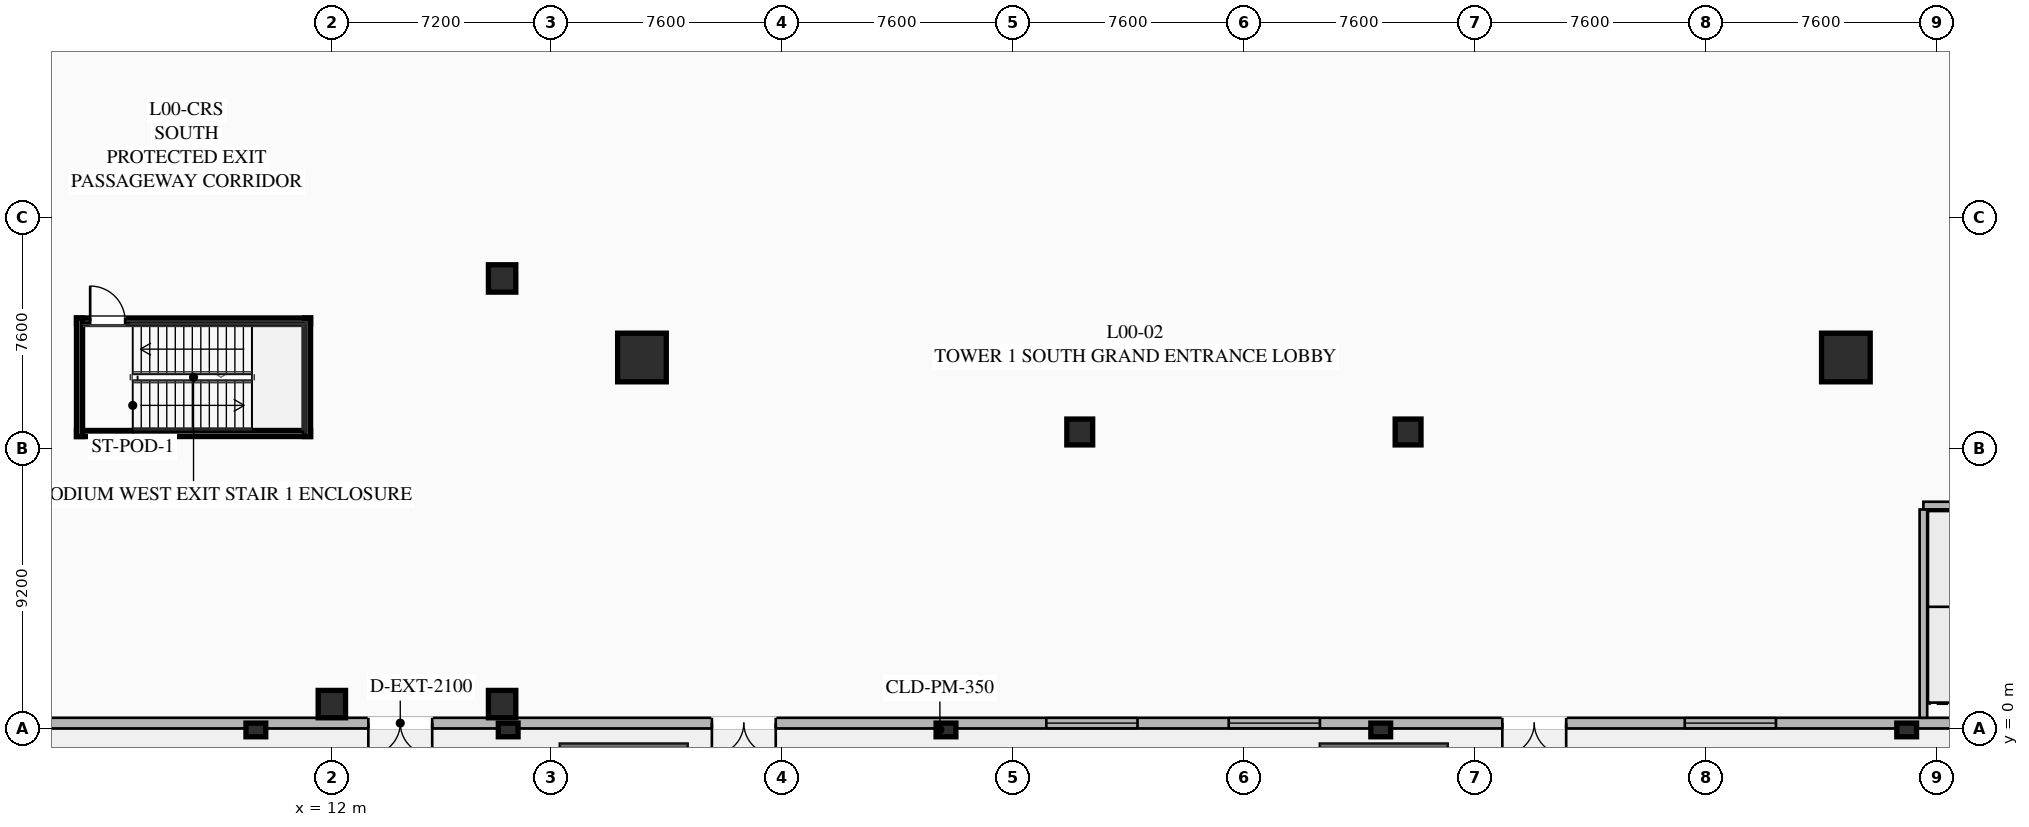
"""IFC4 building model, lengths in metres.
Left out: names, types, materials, properties, quantities, classifications, styles, units other than length and angle.
Written with IfcOpenShell. Run it as: python <this file> out.ifc"""

import sys

from ifc_helpers import new_model, si_unit, direction, frame, frame_2d, origin, origin_2d, place, context, subcontext, project, spatial, rectangle, hollow_rectangle, extrude, element, fill, save


model = new_model("IFC4")
c1 = context("Model", 3, precision=1e-05, world=origin(), true_north=direction((0.0, 1.0)))
c2 = subcontext(c1, "Body", "Model", "MODEL_VIEW")
j1 = project(units=[si_unit("LENGTHUNIT", "METRE"), si_unit("PLANEANGLEUNIT", "RADIAN")], contexts=[c1])
p1 = place(None, origin())
s1 = spatial("IfcSite", under=j1, at=p1, CompositionType="ELEMENT")
p2 = place(p1, origin())
s2 = spatial("IfcBuilding", under=s1, at=p2, CompositionType="ELEMENT")
p3 = place(p2, origin())
s3 = spatial("IfcBuildingStorey", under=s2, at=p3, CompositionType="ELEMENT", Elevation=0.0)
for number, where, z_axis, x_axis in (
    (1, (22.2, 12.2, 0.0), (0.0, 0.0, 1.0), (1.0, 0.0, 0.0)),
    (2, (61.8, 12.2, 0.0), (0.0, 0.0, 1.0), (1.0, 0.0, 0.0)),
):
    element("IfcColumn", number, at=place(p3, frame(where, z_axis=z_axis, x_axis=x_axis)), inside=s3, PredefinedType="COLUMN", context=c2, shape_type="SweptSolid", body=[
        extrude(hollow_rectangle(XDim=1.6, YDim=1.6, WallThickness=0.06, at=origin_2d()), origin(), (0.0, 0.0, 1.0), 5.14),
    ])
for number, where, z_axis, x_axis in (
    (3, (36.6, 9.75, 0.0), (0.0, 0.0, 1.0), (1.0, 0.0, 0.0)),
    (4, (47.4, 9.75, 0.0), (0.0, 0.0, 1.0), (1.0, 0.0, 0.0)),
):
    element("IfcColumn", number, at=place(p3, frame(where, z_axis=z_axis, x_axis=x_axis)), inside=s3, PredefinedType="COLUMN", context=c2, shape_type="SweptSolid", body=[
        extrude(hollow_rectangle(XDim=0.85, YDim=0.85, WallThickness=0.035, at=origin_2d()), origin(), (0.0, 0.0, 1.0), 5.14),
    ])
for number, where, z_axis, x_axis in (
    (5, (12.0, 0.8, 0.0), (0.0, 0.0, 1.0), (1.0, 0.0, 0.0)),
    (6, (17.6, 0.8, 0.0), (0.0, 0.0, 1.0), (1.0, 0.0, 0.0)),
    (7, (17.6, 14.8, 0.0), (0.0, 0.0, 1.0), (1.0, 0.0, 0.0)),
):
    element("IfcColumn", number, at=place(p3, frame(where, z_axis=z_axis, x_axis=x_axis)), inside=s3, PredefinedType="COLUMN", context=c2, shape_type="SweptSolid", body=[
        extrude(rectangle(XDim=0.9, YDim=0.9, at=origin_2d()), origin(), (0.0, 0.0, 1.0), 5.14),
    ])
p4 = place(p3, frame((144.0, 0.175, 0.0), z_axis=(0.0, 0.0, 1.0), x_axis=(-1.0, 0.0, 0.0)))
e8 = element("IfcWall", 8, at=p4, inside=s3, PredefinedType="SOLIDWALL", context=c2, shape_type="SweptSolid", body=[
    extrude(rectangle(XDim=144.0, YDim=0.35, at=frame_2d((72.0, 0.0))), origin(), (0.0, 0.0, 1.0), 5.14),
])
p5 = place(p4, frame((39.0, 0.0, 0.0)))
e9 = element("IfcOpeningElement", 9, at=p5, cuts=e8, PredefinedType="OPENING", context=c2, shape_type="SweptSolid", body=[
    extrude(rectangle(XDim=6.0, YDim=3.2, at=frame_2d((3.0, 1.6))), frame((0.0, 0.185, 0.0), z_axis=(0.0, -1.0, 0.0), x_axis=(1.0, 0.0, 0.0)), (0.0, 0.0, 1.0), 0.37),
])
p6 = place(p4, frame((73.2, 0.0, 0.0)))
e10 = element("IfcOpeningElement", 10, at=p6, cuts=e8, PredefinedType="OPENING", context=c2, shape_type="SweptSolid", body=[
    extrude(rectangle(XDim=2.6, YDim=2.75, at=frame_2d((1.3, 1.375))), frame((0.0, 0.185, 0.0), z_axis=(0.0, -1.0, 0.0), x_axis=(1.0, 0.0, 0.0)), (0.0, 0.0, 1.0), 0.37),
])
p7 = place(p4, frame((58.6, 0.0, 0.0)))
e11 = element("IfcOpeningElement", 11, at=p7, cuts=e8, PredefinedType="OPENING", context=c2, shape_type="SweptSolid", body=[
    extrude(rectangle(XDim=2.6, YDim=2.75, at=frame_2d((1.3, 1.375))), frame((0.0, 0.185, 0.0), z_axis=(0.0, -1.0, 0.0), x_axis=(1.0, 0.0, 0.0)), (0.0, 0.0, 1.0), 0.37),
])
p8 = place(p4, frame((128.7, 0.0, 0.0)))
e12 = element("IfcOpeningElement", 12, at=p8, cuts=e8, PredefinedType="OPENING", context=c2, shape_type="SweptSolid", body=[
    extrude(rectangle(XDim=2.1, YDim=2.5, at=frame_2d((1.05, 1.25))), frame((0.0, 0.185, 0.0), z_axis=(0.0, -1.0, 0.0), x_axis=(1.0, 0.0, 0.0)), (0.0, 0.0, 1.0), 0.37),
])
p9 = place(p4, frame((117.4, 0.0, 0.0)))
e13 = element("IfcOpeningElement", 13, at=p9, cuts=e8, PredefinedType="OPENING", context=c2, shape_type="SweptSolid", body=[
    extrude(rectangle(XDim=2.1, YDim=2.5, at=frame_2d((1.05, 1.25))), frame((0.0, 0.185, 0.0), z_axis=(0.0, -1.0, 0.0), x_axis=(1.0, 0.0, 0.0)), (0.0, 0.0, 1.0), 0.37),
])
p10 = place(p4, frame((91.4, 0.0, 0.0)))
e14 = element("IfcOpeningElement", 14, at=p10, cuts=e8, PredefinedType="OPENING", context=c2, shape_type="SweptSolid", body=[
    extrude(rectangle(XDim=2.1, YDim=2.5, at=frame_2d((1.05, 1.25))), frame((0.0, 0.185, 0.0), z_axis=(0.0, -1.0, 0.0), x_axis=(1.0, 0.0, 0.0)), (0.0, 0.0, 1.0), 0.37),
])
p11 = place(p4, frame((68.7, 0.0, 0.0)))
e15 = element("IfcOpeningElement", 15, at=p11, cuts=e8, PredefinedType="OPENING", context=c2, shape_type="SweptSolid", body=[
    extrude(rectangle(XDim=2.1, YDim=2.5, at=frame_2d((1.05, 1.25))), frame((0.0, 0.185, 0.0), z_axis=(0.0, -1.0, 0.0), x_axis=(1.0, 0.0, 0.0)), (0.0, 0.0, 1.0), 0.37),
])
p12 = place(p4, frame((105.5, 0.0, 0.95)))
e16 = element("IfcOpeningElement", 16, at=p12, cuts=e8, PredefinedType="OPENING", context=c2, shape_type="SweptSolid", body=[
    extrude(rectangle(XDim=3.0, YDim=2.4, at=frame_2d((1.5, 1.2))), frame((0.0, 0.185, 0.0), z_axis=(0.0, -1.0, 0.0), x_axis=(1.0, 0.0, 0.0)), (0.0, 0.0, 1.0), 0.37),
])
p13 = place(p4, frame((99.5, 0.0, 0.95)))
e17 = element("IfcOpeningElement", 17, at=p13, cuts=e8, PredefinedType="OPENING", context=c2, shape_type="SweptSolid", body=[
    extrude(rectangle(XDim=3.0, YDim=2.4, at=frame_2d((1.5, 1.2))), frame((0.0, 0.185, 0.0), z_axis=(0.0, -1.0, 0.0), x_axis=(1.0, 0.0, 0.0)), (0.0, 0.0, 1.0), 0.37),
])
p14 = place(p4, frame((84.5, 0.0, 0.95)))
e18 = element("IfcOpeningElement", 18, at=p14, cuts=e8, PredefinedType="OPENING", context=c2, shape_type="SweptSolid", body=[
    extrude(rectangle(XDim=3.0, YDim=2.4, at=frame_2d((1.5, 1.2))), frame((0.0, 0.185, 0.0), z_axis=(0.0, -1.0, 0.0), x_axis=(1.0, 0.0, 0.0)), (0.0, 0.0, 1.0), 0.37),
])
p15 = place(p4, frame((30.5, 0.0, 0.95)))
e19 = element("IfcOpeningElement", 19, at=p15, cuts=e8, PredefinedType="OPENING", context=c2, shape_type="SweptSolid", body=[
    extrude(rectangle(XDim=3.0, YDim=2.4, at=frame_2d((1.5, 1.2))), frame((0.0, 0.185, 0.0), z_axis=(0.0, -1.0, 0.0), x_axis=(1.0, 0.0, 0.0)), (0.0, 0.0, 1.0), 0.37),
])
p16 = place(p4, frame((14.5, 0.0, 0.95)))
e20 = element("IfcOpeningElement", 20, at=p16, cuts=e8, PredefinedType="OPENING", context=c2, shape_type="SweptSolid", body=[
    extrude(rectangle(XDim=3.0, YDim=2.4, at=frame_2d((1.5, 1.2))), frame((0.0, 0.185, 0.0), z_axis=(0.0, -1.0, 0.0), x_axis=(1.0, 0.0, 0.0)), (0.0, 0.0, 1.0), 0.37),
])
for number, where, z_axis, x_axis in (
    (21, (9.5, -0.05, 0.0), (0.0, 0.0, 1.0), (1.0, 0.0, 0.0)),
    (22, (17.8, -0.05, 0.0), (0.0, 0.0, 1.0), (1.0, 0.0, 0.0)),
    (23, (32.2, -0.05, 0.0), (0.0, 0.0, 1.0), (1.0, 0.0, 0.0)),
    (24, (46.5, -0.05, 0.0), (0.0, 0.0, 1.0), (1.0, 0.0, 0.0)),
    (25, (63.8, -0.05, 0.0), (0.0, 0.0, 1.0), (1.0, 0.0, 0.0)),
):
    element("IfcColumn", number, at=place(p3, frame(where, z_axis=z_axis, x_axis=x_axis)), inside=s3, PredefinedType="PILASTER", context=c2, shape_type="SweptSolid", body=[
        extrude(rectangle(XDim=0.65, YDim=0.45, at=origin_2d()), origin(), (0.0, 0.0, 1.0), 5.14),
    ])
p17 = place(p3, frame((3.6, 13.4, 0.0), z_axis=(0.0, 0.0, 1.0), x_axis=(1.0, 0.0, 0.0)))
e26 = element("IfcWall", 26, at=p17, inside=s3, PredefinedType="SHEAR", context=c2, shape_type="SweptSolid", body=[
    extrude(rectangle(XDim=7.7, YDim=0.2, at=frame_2d((3.85, 0.0))), origin(), (0.0, 0.0, 1.0), 5.14),
])
p18 = place(p17, frame((0.45, 0.0, 0.0)))
e27 = element("IfcOpeningElement", 27, at=p18, cuts=e26, PredefinedType="OPENING", context=c2, shape_type="SweptSolid", body=[
    extrude(rectangle(XDim=1.15, YDim=2.2, at=frame_2d((0.575, 1.1))), frame((0.0, 0.11, 0.0), z_axis=(0.0, -1.0, 0.0), x_axis=(1.0, 0.0, 0.0)), (0.0, 0.0, 1.0), 0.22),
])
p19 = place(p3, frame((3.6, 9.7, 0.0), z_axis=(0.0, 0.0, 1.0), x_axis=(1.0, 0.0, 0.0)))
e28 = element("IfcWall", 28, at=p19, inside=s3, PredefinedType="SHEAR", context=c2, shape_type="SweptSolid", body=[
    extrude(rectangle(XDim=7.7, YDim=0.2, at=frame_2d((3.85, 0.0))), origin(), (0.0, 0.0, 1.0), 5.14),
])
for number, where, z_axis, x_axis in (
    (29, (3.7, 9.6, 0.0), (0.0, 0.0, 1.0), (0.0, 1.0, 0.0)),
    (30, (11.2, 9.6, 0.0), (0.0, 0.0, 1.0), (0.0, 1.0, 0.0)),
):
    element("IfcWall", number, at=place(p3, frame(where, z_axis=z_axis, x_axis=x_axis)), inside=s3, PredefinedType="SHEAR", context=c2, shape_type="SweptSolid", body=[
        extrude(rectangle(XDim=3.9, YDim=0.2, at=frame_2d((1.95, 0.0))), origin(), (0.0, 0.0, 1.0), 5.14),
    ])
p20 = place(p3, frame((64.35, 7.33, 0.0), z_axis=(0.0, 0.0, 1.0), x_axis=(1.0, 0.0, 0.0)))
e31 = element("IfcWall", 31, at=p20, inside=s3, PredefinedType="SOLIDWALL", context=c2, shape_type="SweptSolid", body=[
    extrude(rectangle(XDim=41.25, YDim=0.25, at=frame_2d((20.625, 0.0))), origin(), (0.0, 0.0, 1.0), 5.14),
])
p21 = place(p3, frame((64.35, 0.35, 0.0), z_axis=(0.0, 0.0, 1.0), x_axis=(0.0, 1.0, 0.0)))
e32 = element("IfcWall", 32, at=p21, inside=s3, PredefinedType="SOLIDWALL", context=c2, shape_type="SweptSolid", body=[
    extrude(rectangle(XDim=6.85, YDim=0.25, at=frame_2d((3.425, 0.0))), origin(), (0.0, 0.0, 1.0), 5.14),
])
p22 = place(p8, origin())
e33 = element("IfcDoor", 33, at=p22, inside=s3, OperationType="DOUBLE_DOOR_SINGLE_SWING", PredefinedType="DOOR", context=c2, shape_type="SweptSolid", body=[
    extrude(rectangle(XDim=2.1, YDim=2.5, at=frame_2d((1.05, 1.25))), frame((0.0, 0.025, 0.0), z_axis=(0.0, -1.0, 0.0), x_axis=(1.0, 0.0, 0.0)), (0.0, 0.0, 1.0), 0.05),
])
fill(e12, e33)
p23 = place(p9, origin())
e34 = element("IfcDoor", 34, at=p23, inside=s3, OperationType="DOUBLE_DOOR_SINGLE_SWING", PredefinedType="DOOR", context=c2, shape_type="SweptSolid", body=[
    extrude(rectangle(XDim=2.1, YDim=2.5, at=frame_2d((1.05, 1.25))), frame((0.0, 0.025, 0.0), z_axis=(0.0, -1.0, 0.0), x_axis=(1.0, 0.0, 0.0)), (0.0, 0.0, 1.0), 0.05),
])
fill(e13, e34)
p24 = place(p10, origin())
e35 = element("IfcDoor", 35, at=p24, inside=s3, OperationType="DOUBLE_DOOR_SINGLE_SWING", PredefinedType="DOOR", context=c2, shape_type="SweptSolid", body=[
    extrude(rectangle(XDim=2.1, YDim=2.5, at=frame_2d((1.05, 1.25))), frame((0.0, 0.025, 0.0), z_axis=(0.0, -1.0, 0.0), x_axis=(1.0, 0.0, 0.0)), (0.0, 0.0, 1.0), 0.05),
])
fill(e14, e35)
p25 = place(p12, origin())
e36 = element("IfcWindow", 36, at=p25, inside=s3, PartitioningType="SINGLE_PANEL", PredefinedType="WINDOW", context=c2, shape_type="SweptSolid", body=[
    extrude(rectangle(XDim=3.0, YDim=2.4, at=frame_2d((1.5, 1.2))), frame((0.0, 0.03, 0.0), z_axis=(0.0, -1.0, 0.0), x_axis=(1.0, 0.0, 0.0)), (0.0, 0.0, 1.0), 0.06),
])
fill(e16, e36)
p26 = place(p13, origin())
e37 = element("IfcWindow", 37, at=p26, inside=s3, PartitioningType="SINGLE_PANEL", PredefinedType="WINDOW", context=c2, shape_type="SweptSolid", body=[
    extrude(rectangle(XDim=3.0, YDim=2.4, at=frame_2d((1.5, 1.2))), frame((0.0, 0.03, 0.0), z_axis=(0.0, -1.0, 0.0), x_axis=(1.0, 0.0, 0.0)), (0.0, 0.0, 1.0), 0.06),
])
fill(e17, e37)
p27 = place(p14, origin())
e38 = element("IfcWindow", 38, at=p27, inside=s3, PartitioningType="SINGLE_PANEL", PredefinedType="WINDOW", context=c2, shape_type="SweptSolid", body=[
    extrude(rectangle(XDim=3.0, YDim=2.4, at=frame_2d((1.5, 1.2))), frame((0.0, 0.03, 0.0), z_axis=(0.0, -1.0, 0.0), x_axis=(1.0, 0.0, 0.0)), (0.0, 0.0, 1.0), 0.06),
])
fill(e18, e38)
p28 = place(p18, origin())
e39 = element("IfcDoor", 39, at=p28, inside=s3, OperationType="SINGLE_SWING_LEFT", PredefinedType="DOOR", context=c2, shape_type="SweptSolid", body=[
    extrude(rectangle(XDim=1.15, YDim=2.2, at=frame_2d((0.575, 1.1))), frame((0.0, 0.025, 0.0), z_axis=(0.0, -1.0, 0.0), x_axis=(1.0, 0.0, 0.0)), (0.0, 0.0, 1.0), 0.05),
])
fill(e27, e39)
save(model, sys.argv[1])
